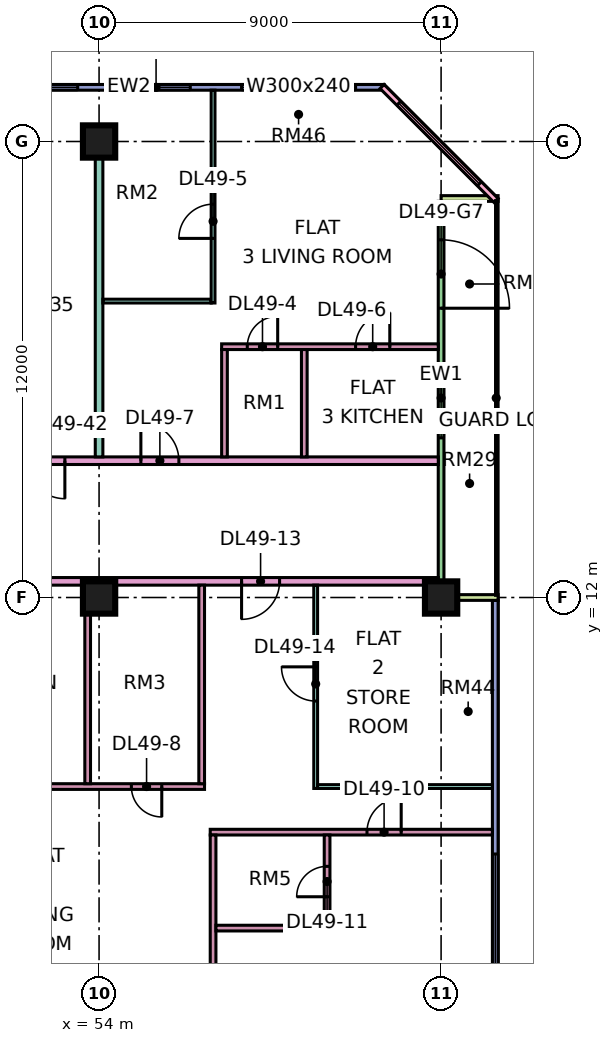
"""IFC4 building model, lengths in metres.
Left out: names, types, materials, properties, quantities, classifications, styles, units other than length and angle.
Written with IfcOpenShell. Run it as: python <this file> out.ifc"""

import sys

from ifc_helpers import new_model, si_unit, direction, frame, frame_2d, origin, origin_2d, place, context, subcontext, project, spatial, rectangle, extrude, element, fill, save


model = new_model("IFC4")
c1 = context("Model", 3, precision=1e-05, world=origin(), true_north=direction((0.0, 1.0)))
c2 = subcontext(c1, "Body", "Model", "MODEL_VIEW")
j1 = project(units=[si_unit("LENGTHUNIT", "METRE"), si_unit("PLANEANGLEUNIT", "RADIAN")], contexts=[c1])
p1 = place(None, origin())
s1 = spatial("IfcSite", under=j1, at=p1, CompositionType="ELEMENT")
p2 = place(p1, origin())
s2 = spatial("IfcBuilding", under=s1, at=p2, CompositionType="ELEMENT")
p3 = place(p2, frame((0.0, 0.0, 211.65)))
s3 = spatial("IfcBuildingStorey", under=s2, at=p3, CompositionType="ELEMENT", Elevation=211.65)
for number, where, z_axis, x_axis in (
    (1, (54.0, 12.0, 0.0), (0.0, 0.0, 1.0), (1.0, 0.0, 0.0)),
    (2, (54.0, 24.0, 0.0), (0.0, 0.0, 1.0), (1.0, 0.0, 0.0)),
    (3, (63.0, 12.0, 0.0), (0.0, 0.0, 1.0), (1.0, 0.0, 0.0)),
):
    element("IfcColumn", number, at=place(p3, frame(where, z_axis=z_axis, x_axis=x_axis)), inside=s3, PredefinedType="COLUMN", context=c2, shape_type="SweptSolid", body=[
        extrude(rectangle(XDim=0.85, YDim=0.85, at=origin_2d()), origin(), (0.0, 0.0, 1.0), 3.75),
    ])
p4 = place(p3, frame((61.5, 25.425, 0.0), z_axis=(0.0, 0.0, 1.0), x_axis=(-1.0, 0.0, 0.0)))
e4 = element("IfcWall", 4, at=p4, inside=s3, PredefinedType="SOLIDWALL", context=c2, shape_type="SweptSolid", body=[
    extrude(rectangle(XDim=13.425, YDim=0.15, at=frame_2d((6.712, 0.0))), origin(), (0.0, 0.0, 1.0), 3.35),
])
p5 = place(p4, frame((0.75, 0.0, 0.45)))
e5 = element("IfcOpeningElement", 5, at=p5, cuts=e4, PredefinedType="OPENING", context=c2, shape_type="SweptSolid", body=[
    extrude(rectangle(XDim=3.0, YDim=2.4, at=frame_2d((1.5, 1.2))), frame((0.0, 0.085, 0.0), z_axis=(0.0, -1.0, 0.0), x_axis=(1.0, 0.0, 0.0)), (0.0, 0.0, 1.0), 0.17),
])
p6 = place(p4, frame((5.1, 0.0, 0.45)))
e6 = element("IfcOpeningElement", 6, at=p6, cuts=e4, PredefinedType="OPENING", context=c2, shape_type="SweptSolid", body=[
    extrude(rectangle(XDim=1.8, YDim=2.4, at=frame_2d((0.9, 1.2))), frame((0.0, 0.085, 0.0), z_axis=(0.0, -1.0, 0.0), x_axis=(1.0, 0.0, 0.0)), (0.0, 0.0, 1.0), 0.17),
])
p7 = place(p4, frame((8.062, 0.0, 0.45)))
e7 = element("IfcOpeningElement", 7, at=p7, cuts=e4, PredefinedType="OPENING", context=c2, shape_type="SweptSolid", body=[
    extrude(rectangle(XDim=4.8, YDim=2.4, at=frame_2d((2.4, 1.2))), frame((0.0, 0.085, 0.0), z_axis=(0.0, -1.0, 0.0), x_axis=(1.0, 0.0, 0.0)), (0.0, 0.0, 1.0), 0.17),
])
p8 = place(p3, frame((64.425, 1.5, 0.0), z_axis=(0.0, 0.0, 1.0), x_axis=(0.0, 1.0, 0.0)))
e8 = element("IfcWall", 8, at=p8, inside=s3, PredefinedType="SOLIDWALL", context=c2, shape_type="SweptSolid", body=[
    extrude(rectangle(XDim=10.425, YDim=0.15, at=frame_2d((5.212, 0.0))), origin(), (0.0, 0.0, 1.0), 3.35),
])
p9 = place(p8, frame((0.75, 0.0, 0.45)))
e9 = element("IfcOpeningElement", 9, at=p9, cuts=e8, PredefinedType="OPENING", context=c2, shape_type="SweptSolid", body=[
    extrude(rectangle(XDim=3.0, YDim=2.4, at=frame_2d((1.5, 1.2))), frame((0.0, 0.085, 0.0), z_axis=(0.0, -1.0, 0.0), x_axis=(1.0, 0.0, 0.0)), (0.0, 0.0, 1.0), 0.17),
])
p10 = place(p3, frame((63.0, 12.075, 0.0), z_axis=(0.0, 0.0, 1.0), x_axis=(0.0, 1.0, 0.0)))
e10 = element("IfcWall", 10, at=p10, inside=s3, PredefinedType="SOLIDWALL", context=c2, shape_type="SweptSolid", body=[
    extrude(rectangle(XDim=10.35, YDim=0.15, at=frame_2d((5.175, 0.0))), origin(), (0.0, 0.0, 1.0), 3.35),
])
p11 = place(p10, frame((4.125, 0.0, 0.45)))
e11 = element("IfcOpeningElement", 11, at=p11, cuts=e10, PredefinedType="OPENING", context=c2, shape_type="SweptSolid", body=[
    extrude(rectangle(XDim=1.8, YDim=2.4, at=frame_2d((0.9, 1.2))), frame((0.0, 0.085, 0.0), z_axis=(0.0, -1.0, 0.0), x_axis=(1.0, 0.0, 0.0)), (0.0, 0.0, 1.0), 0.17),
])
p12 = place(p10, frame((7.538, 0.0, 0.0)))
e12 = element("IfcOpeningElement", 12, at=p12, cuts=e10, PredefinedType="OPENING", context=c2, shape_type="SweptSolid", body=[
    extrude(rectangle(XDim=1.8, YDim=2.4, at=frame_2d((0.9, 1.2))), frame((0.0, 0.085, 0.0), z_axis=(0.0, -1.0, 0.0), x_axis=(1.0, 0.0, 0.0)), (0.0, 0.0, 1.0), 0.17),
])
for number, where, z_axis, x_axis in (
    (13, (64.5, 12.0, 0.0), (0.0, 0.0, 1.0), (-1.0, 0.0, 0.0)),
    (14, (64.5, 22.5, 0.0), (0.0, 0.0, 1.0), (-1.0, 0.0, 0.0)),
):
    element("IfcWall", number, at=place(p3, frame(where, z_axis=z_axis, x_axis=x_axis)), inside=s3, PredefinedType="SOLIDWALL", context=c2, shape_type="SweptSolid", body=[
        extrude(rectangle(XDim=1.5, YDim=0.15, at=frame_2d((0.75, 0.0))), origin(), (0.0, 0.0, 1.0), 3.35),
    ])
p13 = place(p3, frame((64.447, 22.447, 0.0), z_axis=(0.0, 0.0, 1.0), x_axis=(-0.707106781187, 0.707106781187, 0.0)))
e15 = element("IfcWall", 15, at=p13, inside=s3, PredefinedType="SOLIDWALL", context=c2, shape_type="SweptSolid", body=[
    extrude(rectangle(XDim=4.243, YDim=0.15, at=frame_2d((2.121, 0.0))), origin(), (0.0, 0.0, 1.0), 3.35),
])
p14 = place(p13, frame((0.621, 0.0, 0.45)))
e16 = element("IfcOpeningElement", 16, at=p14, cuts=e15, PredefinedType="OPENING", context=c2, shape_type="SweptSolid", body=[
    extrude(rectangle(XDim=3.0, YDim=2.4, at=frame_2d((1.5, 1.2))), frame((0.0, 0.085, 0.0), z_axis=(0.0, -1.0, 0.0), x_axis=(1.0, 0.0, 0.0)), (0.0, 0.0, 1.0), 0.17),
])
p15 = place(p3, frame((40.65, 12.425, 0.0), z_axis=(0.0, 0.0, 1.0), x_axis=(1.0, 0.0, 0.0)))
e17 = element("IfcWall", 17, at=p15, inside=s3, PredefinedType="PARTITIONING", context=c2, shape_type="SweptSolid", body=[
    extrude(rectangle(XDim=22.276, YDim=0.2, at=frame_2d((11.138, 0.0))), origin(), (0.0, 0.0, 1.0), 3.35),
])
p16 = place(p15, frame((17.1, 0.0, 0.0)))
e18 = element("IfcOpeningElement", 18, at=p16, cuts=e17, PredefinedType="OPENING", context=c2, shape_type="SweptSolid", body=[
    extrude(rectangle(XDim=1.0, YDim=2.1, at=frame_2d((0.5, 1.05))), frame((0.0, 0.11, 0.0), z_axis=(0.0, -1.0, 0.0), x_axis=(1.0, 0.0, 0.0)), (0.0, 0.0, 1.0), 0.22),
])
p17 = place(p15, frame((1.05, 0.0, 0.0)))
e19 = element("IfcOpeningElement", 19, at=p17, cuts=e17, PredefinedType="OPENING", context=c2, shape_type="SweptSolid", body=[
    extrude(rectangle(XDim=1.0, YDim=2.1, at=frame_2d((0.5, 1.05))), frame((0.0, 0.11, 0.0), z_axis=(0.0, -1.0, 0.0), x_axis=(1.0, 0.0, 0.0)), (0.0, 0.0, 1.0), 0.22),
])
p18 = place(p3, frame((48.1, 7.025, 0.0), z_axis=(0.0, 0.0, 1.0), x_axis=(1.0, 0.0, 0.0)))
e20 = element("IfcWall", 20, at=p18, inside=s3, PredefinedType="PARTITIONING", context=c2, shape_type="SweptSolid", body=[
    extrude(rectangle(XDim=8.675, YDim=0.15, at=frame_2d((4.337, 0.0))), origin(), (0.0, 0.0, 1.0), 3.35),
])
p19 = place(p18, frame((6.75, 0.0, 0.0)))
e21 = element("IfcOpeningElement", 21, at=p19, cuts=e20, PredefinedType="OPENING", context=c2, shape_type="SweptSolid", body=[
    extrude(rectangle(XDim=0.8, YDim=2.1, at=frame_2d((0.4, 1.05))), frame((0.0, 0.085, 0.0), z_axis=(0.0, -1.0, 0.0), x_axis=(1.0, 0.0, 0.0)), (0.0, 0.0, 1.0), 0.17),
])
p20 = place(p18, frame((2.3, 0.0, 0.0)))
e22 = element("IfcOpeningElement", 22, at=p20, cuts=e20, PredefinedType="OPENING", context=c2, shape_type="SweptSolid", body=[
    extrude(rectangle(XDim=0.9, YDim=2.1, at=frame_2d((0.45, 1.05))), frame((0.0, 0.085, 0.0), z_axis=(0.0, -1.0, 0.0), x_axis=(1.0, 0.0, 0.0)), (0.0, 0.0, 1.0), 0.17),
])
p21 = place(p3, frame((51.225, 15.6, 0.0), z_axis=(0.0, 0.0, 1.0), x_axis=(1.0, 0.0, 0.0)))
e23 = element("IfcWall", 23, at=p21, inside=s3, PredefinedType="PARTITIONING", context=c2, shape_type="SweptSolid", body=[
    extrude(rectangle(XDim=11.701, YDim=0.2, at=frame_2d((5.851, 0.0))), origin(), (0.0, 0.0, 1.0), 3.35),
])
p22 = place(p21, frame((3.875, 0.0, 0.0)))
e24 = element("IfcOpeningElement", 24, at=p22, cuts=e23, PredefinedType="OPENING", context=c2, shape_type="SweptSolid", body=[
    extrude(rectangle(XDim=1.0, YDim=2.1, at=frame_2d((0.5, 1.05))), frame((0.0, 0.11, 0.0), z_axis=(0.0, -1.0, 0.0), x_axis=(1.0, 0.0, 0.0)), (0.0, 0.0, 1.0), 0.22),
])
p23 = place(p21, frame((0.875, 0.0, 0.0)))
e25 = element("IfcOpeningElement", 25, at=p23, cuts=e23, PredefinedType="OPENING", context=c2, shape_type="SweptSolid", body=[
    extrude(rectangle(XDim=1.0, YDim=2.1, at=frame_2d((0.5, 1.05))), frame((0.0, 0.11, 0.0), z_axis=(0.0, -1.0, 0.0), x_axis=(1.0, 0.0, 0.0)), (0.0, 0.0, 1.0), 0.22),
])
p24 = place(p3, frame((53.7, 7.1, 0.0), z_axis=(0.0, 0.0, 1.0), x_axis=(0.0, 1.0, 0.0)))
e26 = element("IfcWall", 26, at=p24, inside=s3, PredefinedType="PARTITIONING", context=c2, shape_type="SweptSolid", body=[
    extrude(rectangle(XDim=5.225, YDim=0.15, at=frame_2d((2.612, 0.0))), origin(), (0.0, 0.0, 1.0), 3.35),
])
p25 = place(p3, frame((54.0, 15.7, 0.0), z_axis=(0.0, 0.0, 1.0), x_axis=(0.0, 1.0, 0.0)))
e27 = element("IfcWall", 27, at=p25, inside=s3, PredefinedType="PARTITIONING", context=c2, shape_type="SweptSolid", body=[
    extrude(rectangle(XDim=8.3, YDim=0.2, at=frame_2d((4.15, 0.0))), origin(), (0.0, 0.0, 1.0), 3.35),
])
p26 = place(p3, frame((54.1, 19.8, 0.0), z_axis=(0.0, 0.0, 1.0), x_axis=(1.0, 0.0, 0.0)))
e28 = element("IfcWall", 28, at=p26, inside=s3, PredefinedType="PARTITIONING", context=c2, shape_type="SweptSolid", body=[
    extrude(rectangle(XDim=2.85, YDim=0.1, at=frame_2d((1.425, 0.0))), origin(), (0.0, 0.0, 1.0), 3.35),
])
p27 = place(p3, frame((56.7, 7.1, 0.0), z_axis=(0.0, 0.0, 1.0), x_axis=(0.0, 1.0, 0.0)))
e29 = element("IfcWall", 29, at=p27, inside=s3, PredefinedType="PARTITIONING", context=c2, shape_type="SweptSolid", body=[
    extrude(rectangle(XDim=5.225, YDim=0.15, at=frame_2d((2.612, 0.0))), origin(), (0.0, 0.0, 1.0), 3.35),
])
p28 = place(p3, frame((56.925, 5.825, 0.0), z_axis=(0.0, 0.0, 1.0), x_axis=(1.0, 0.0, 0.0)))
e30 = element("IfcWall", 30, at=p28, inside=s3, PredefinedType="PARTITIONING", context=c2, shape_type="SweptSolid", body=[
    extrude(rectangle(XDim=7.425, YDim=0.15, at=frame_2d((3.712, 0.0))), origin(), (0.0, 0.0, 1.0), 3.35),
])
p29 = place(p28, frame((4.125, 0.0, 0.0)))
e31 = element("IfcOpeningElement", 31, at=p29, cuts=e30, PredefinedType="OPENING", context=c2, shape_type="SweptSolid", body=[
    extrude(rectangle(XDim=0.9, YDim=2.1, at=frame_2d((0.45, 1.05))), frame((0.0, 0.085, 0.0), z_axis=(0.0, -1.0, 0.0), x_axis=(1.0, 0.0, 0.0)), (0.0, 0.0, 1.0), 0.17),
])
p30 = place(p3, frame((57.0, -1.35, 0.0), z_axis=(0.0, 0.0, 1.0), x_axis=(0.0, 1.0, 0.0)))
e32 = element("IfcWall", 32, at=p30, inside=s3, PredefinedType="PARTITIONING", context=c2, shape_type="SweptSolid", body=[
    extrude(rectangle(XDim=7.1, YDim=0.15, at=frame_2d((3.55, 0.0))), origin(), (0.0, 0.0, 1.0), 3.35),
])
p31 = place(p3, frame((57.0, 19.75, 0.0), z_axis=(0.0, 0.0, 1.0), x_axis=(0.0, 1.0, 0.0)))
e33 = element("IfcWall", 33, at=p31, inside=s3, PredefinedType="PARTITIONING", context=c2, shape_type="SweptSolid", body=[
    extrude(rectangle(XDim=5.6, YDim=0.1, at=frame_2d((2.8, 0.0))), origin(), (0.0, 0.0, 1.0), 3.35),
])
p32 = place(p31, frame((1.7, 0.0, 0.0)))
e34 = element("IfcOpeningElement", 34, at=p32, cuts=e33, PredefinedType="OPENING", context=c2, shape_type="SweptSolid", body=[
    extrude(rectangle(XDim=0.9, YDim=2.1, at=frame_2d((0.45, 1.05))), frame((0.0, 0.06, 0.0), z_axis=(0.0, -1.0, 0.0), x_axis=(1.0, 0.0, 0.0)), (0.0, 0.0, 1.0), 0.12),
])
p33 = place(p3, frame((57.075, 3.3, 0.0), z_axis=(0.0, 0.0, 1.0), x_axis=(1.0, 0.0, 0.0)))
e35 = element("IfcWall", 35, at=p33, inside=s3, PredefinedType="PARTITIONING", context=c2, shape_type="SweptSolid", body=[
    extrude(rectangle(XDim=3.0, YDim=0.15, at=frame_2d((1.5, 0.0))), origin(), (0.0, 0.0, 1.0), 3.35),
])
p34 = place(p3, frame((57.225, 18.6, 0.0), z_axis=(0.0, 0.0, 1.0), x_axis=(1.0, 0.0, 0.0)))
e36 = element("IfcWall", 36, at=p34, inside=s3, PredefinedType="PARTITIONING", context=c2, shape_type="SweptSolid", body=[
    extrude(rectangle(XDim=5.701, YDim=0.15, at=frame_2d((2.851, 0.0))), origin(), (0.0, 0.0, 1.0), 3.35),
])
p35 = place(p34, frame((0.675, 0.0, 0.0)))
e37 = element("IfcOpeningElement", 37, at=p35, cuts=e36, PredefinedType="OPENING", context=c2, shape_type="SweptSolid", body=[
    extrude(rectangle(XDim=0.8, YDim=2.1, at=frame_2d((0.4, 1.05))), frame((0.0, 0.085, 0.0), z_axis=(0.0, -1.0, 0.0), x_axis=(1.0, 0.0, 0.0)), (0.0, 0.0, 1.0), 0.17),
])
p36 = place(p34, frame((3.525, 0.0, 0.0)))
e38 = element("IfcOpeningElement", 38, at=p36, cuts=e36, PredefinedType="OPENING", context=c2, shape_type="SweptSolid", body=[
    extrude(rectangle(XDim=0.9, YDim=2.1, at=frame_2d((0.45, 1.05))), frame((0.0, 0.085, 0.0), z_axis=(0.0, -1.0, 0.0), x_axis=(1.0, 0.0, 0.0)), (0.0, 0.0, 1.0), 0.17),
])
for number, where, z_axis, x_axis in (
    (39, (57.3, 15.7, 0.0), (0.0, 0.0, 1.0), (0.0, 1.0, 0.0)),
    (40, (59.4, 15.7, 0.0), (0.0, 0.0, 1.0), (0.0, 1.0, 0.0)),
):
    element("IfcWall", number, at=place(p3, frame(where, z_axis=z_axis, x_axis=x_axis)), inside=s3, PredefinedType="PARTITIONING", context=c2, shape_type="SweptSolid", body=[
        extrude(rectangle(XDim=2.825, YDim=0.15, at=frame_2d((1.413, 0.0))), origin(), (0.0, 0.0, 1.0), 3.35),
    ])
p37 = place(p3, frame((59.7, 6.975, 0.0), z_axis=(0.0, 0.0, 1.0), x_axis=(0.0, 1.0, 0.0)))
e41 = element("IfcWall", 41, at=p37, inside=s3, PredefinedType="PARTITIONING", context=c2, shape_type="SweptSolid", body=[
    extrude(rectangle(XDim=5.35, YDim=0.1, at=frame_2d((2.675, 0.0))), origin(), (0.0, 0.0, 1.0), 3.35),
])
p38 = place(p37, frame((2.3, 0.0, 0.0)))
e42 = element("IfcOpeningElement", 42, at=p38, cuts=e41, PredefinedType="OPENING", context=c2, shape_type="SweptSolid", body=[
    extrude(rectangle(XDim=0.9, YDim=2.1, at=frame_2d((0.45, 1.05))), frame((0.0, 0.06, 0.0), z_axis=(0.0, -1.0, 0.0), x_axis=(1.0, 0.0, 0.0)), (0.0, 0.0, 1.0), 0.12),
])
p39 = place(p3, frame((59.75, 7.025, 0.0), z_axis=(0.0, 0.0, 1.0), x_axis=(1.0, 0.0, 0.0)))
e43 = element("IfcWall", 43, at=p39, inside=s3, PredefinedType="PARTITIONING", context=c2, shape_type="SweptSolid", body=[
    extrude(rectangle(XDim=4.6, YDim=0.1, at=frame_2d((2.3, 0.0))), origin(), (0.0, 0.0, 1.0), 3.35),
])
p40 = place(p3, frame((60.0, 3.375, 0.0), z_axis=(0.0, 0.0, 1.0), x_axis=(0.0, 1.0, 0.0)))
e44 = element("IfcWall", 44, at=p40, inside=s3, PredefinedType="PARTITIONING", context=c2, shape_type="SweptSolid", body=[
    extrude(rectangle(XDim=2.375, YDim=0.15, at=frame_2d((1.188, 0.0))), origin(), (0.0, 0.0, 1.0), 3.35),
])
p41 = place(p40, frame((0.75, 0.0, 0.0)))
e45 = element("IfcOpeningElement", 45, at=p41, cuts=e44, PredefinedType="OPENING", context=c2, shape_type="SweptSolid", body=[
    extrude(rectangle(XDim=0.8, YDim=2.1, at=frame_2d((0.4, 1.05))), frame((0.0, 0.085, 0.0), z_axis=(0.0, -1.0, 0.0), x_axis=(1.0, 0.0, 0.0)), (0.0, 0.0, 1.0), 0.17),
])
p42 = place(p5, origin())
e46 = element("IfcWindow", 46, at=p42, inside=s3, PartitioningType="SINGLE_PANEL", PredefinedType="WINDOW", context=c2, shape_type="SweptSolid", body=[
    extrude(rectangle(XDim=3.0, YDim=2.4, at=frame_2d((1.5, 1.2))), frame((0.0, 0.03, 0.0), z_axis=(0.0, -1.0, 0.0), x_axis=(1.0, 0.0, 0.0)), (0.0, 0.0, 1.0), 0.06),
])
fill(e5, e46)
p43 = place(p6, origin())
e47 = element("IfcWindow", 47, at=p43, inside=s3, PartitioningType="SINGLE_PANEL", PredefinedType="WINDOW", context=c2, shape_type="SweptSolid", body=[
    extrude(rectangle(XDim=1.8, YDim=2.4, at=frame_2d((0.9, 1.2))), frame((0.0, 0.03, 0.0), z_axis=(0.0, -1.0, 0.0), x_axis=(1.0, 0.0, 0.0)), (0.0, 0.0, 1.0), 0.06),
])
fill(e6, e47)
p44 = place(p7, origin())
e48 = element("IfcWindow", 48, at=p44, inside=s3, PartitioningType="SINGLE_PANEL", PredefinedType="WINDOW", context=c2, shape_type="SweptSolid", body=[
    extrude(rectangle(XDim=4.8, YDim=2.4, at=frame_2d((2.4, 1.2))), frame((0.0, 0.03, 0.0), z_axis=(0.0, -1.0, 0.0), x_axis=(1.0, 0.0, 0.0)), (0.0, 0.0, 1.0), 0.06),
])
fill(e7, e48)
p45 = place(p9, origin())
e49 = element("IfcWindow", 49, at=p45, inside=s3, PartitioningType="SINGLE_PANEL", PredefinedType="WINDOW", context=c2, shape_type="SweptSolid", body=[
    extrude(rectangle(XDim=3.0, YDim=2.4, at=frame_2d((1.5, 1.2))), frame((0.0, 0.03, 0.0), z_axis=(0.0, -1.0, 0.0), x_axis=(1.0, 0.0, 0.0)), (0.0, 0.0, 1.0), 0.06),
])
fill(e9, e49)
p46 = place(p11, origin())
e50 = element("IfcWindow", 50, at=p46, inside=s3, PartitioningType="SINGLE_PANEL", PredefinedType="WINDOW", context=c2, shape_type="SweptSolid", body=[
    extrude(rectangle(XDim=1.8, YDim=2.4, at=frame_2d((0.9, 1.2))), frame((0.0, 0.03, 0.0), z_axis=(0.0, -1.0, 0.0), x_axis=(1.0, 0.0, 0.0)), (0.0, 0.0, 1.0), 0.06),
])
fill(e11, e50)
p47 = place(p12, frame((1.8, 0.0, 0.0), z_axis=(0.0, 0.0, 1.0), x_axis=(-1.0, 0.0, 0.0)))
e51 = element("IfcDoor", 51, at=p47, inside=s3, OperationType="DOUBLE_DOOR_SINGLE_SWING", PredefinedType="DOOR", context=c2, shape_type="SweptSolid", body=[
    extrude(rectangle(XDim=1.8, YDim=2.4, at=frame_2d((0.9, 1.2))), frame((0.0, 0.025, 0.0), z_axis=(0.0, -1.0, 0.0), x_axis=(1.0, 0.0, 0.0)), (0.0, 0.0, 1.0), 0.05),
])
fill(e12, e51)
p48 = place(p14, origin())
e52 = element("IfcWindow", 52, at=p48, inside=s3, PartitioningType="SINGLE_PANEL", PredefinedType="WINDOW", context=c2, shape_type="SweptSolid", body=[
    extrude(rectangle(XDim=3.0, YDim=2.4, at=frame_2d((1.5, 1.2))), frame((0.0, 0.03, 0.0), z_axis=(0.0, -1.0, 0.0), x_axis=(1.0, 0.0, 0.0)), (0.0, 0.0, 1.0), 0.06),
])
fill(e16, e52)
p49 = place(p35, frame((0.8, 0.0, 0.0), z_axis=(0.0, 0.0, 1.0), x_axis=(-1.0, 0.0, 0.0)))
e53 = element("IfcDoor", 53, at=p49, inside=s3, OperationType="SINGLE_SWING_RIGHT", PredefinedType="DOOR", context=c2, shape_type="SweptSolid", body=[
    extrude(rectangle(XDim=0.8, YDim=2.1, at=frame_2d((0.4, 1.05))), frame((0.0, 0.025, 0.0), z_axis=(0.0, -1.0, 0.0), x_axis=(1.0, 0.0, 0.0)), (0.0, 0.0, 1.0), 0.05),
])
fill(e37, e53)
p50 = place(p32, origin())
e54 = element("IfcDoor", 54, at=p50, inside=s3, OperationType="SINGLE_SWING_LEFT", PredefinedType="DOOR", context=c2, shape_type="SweptSolid", body=[
    extrude(rectangle(XDim=0.9, YDim=2.1, at=frame_2d((0.45, 1.05))), frame((0.0, 0.025, 0.0), z_axis=(0.0, -1.0, 0.0), x_axis=(1.0, 0.0, 0.0)), (0.0, 0.0, 1.0), 0.05),
])
fill(e34, e54)
p51 = place(p36, frame((0.9, 0.0, 0.0), z_axis=(0.0, 0.0, 1.0), x_axis=(-1.0, 0.0, 0.0)))
e55 = element("IfcDoor", 55, at=p51, inside=s3, OperationType="SINGLE_SWING_RIGHT", PredefinedType="DOOR", context=c2, shape_type="SweptSolid", body=[
    extrude(rectangle(XDim=0.9, YDim=2.1, at=frame_2d((0.45, 1.05))), frame((0.0, 0.025, 0.0), z_axis=(0.0, -1.0, 0.0), x_axis=(1.0, 0.0, 0.0)), (0.0, 0.0, 1.0), 0.05),
])
fill(e38, e55)
p52 = place(p22, origin())
e56 = element("IfcDoor", 56, at=p52, inside=s3, OperationType="SINGLE_SWING_LEFT", PredefinedType="DOOR", context=c2, shape_type="SweptSolid", body=[
    extrude(rectangle(XDim=1.0, YDim=2.1, at=frame_2d((0.5, 1.05))), frame((0.0, 0.025, 0.0), z_axis=(0.0, -1.0, 0.0), x_axis=(1.0, 0.0, 0.0)), (0.0, 0.0, 1.0), 0.05),
])
fill(e24, e56)
p53 = place(p19, origin())
e57 = element("IfcDoor", 57, at=p53, inside=s3, OperationType="SINGLE_SWING_RIGHT", PredefinedType="DOOR", context=c2, shape_type="SweptSolid", body=[
    extrude(rectangle(XDim=0.8, YDim=2.1, at=frame_2d((0.4, 1.05))), frame((0.0, 0.025, 0.0), z_axis=(0.0, -1.0, 0.0), x_axis=(1.0, 0.0, 0.0)), (0.0, 0.0, 1.0), 0.05),
])
fill(e21, e57)
p54 = place(p29, frame((0.9, 0.0, 0.0), z_axis=(0.0, 0.0, 1.0), x_axis=(-1.0, 0.0, 0.0)))
e58 = element("IfcDoor", 58, at=p54, inside=s3, OperationType="SINGLE_SWING_RIGHT", PredefinedType="DOOR", context=c2, shape_type="SweptSolid", body=[
    extrude(rectangle(XDim=0.9, YDim=2.1, at=frame_2d((0.45, 1.05))), frame((0.0, 0.025, 0.0), z_axis=(0.0, -1.0, 0.0), x_axis=(1.0, 0.0, 0.0)), (0.0, 0.0, 1.0), 0.05),
])
fill(e31, e58)
p55 = place(p41, origin())
e59 = element("IfcDoor", 59, at=p55, inside=s3, OperationType="SINGLE_SWING_LEFT", PredefinedType="DOOR", context=c2, shape_type="SweptSolid", body=[
    extrude(rectangle(XDim=0.8, YDim=2.1, at=frame_2d((0.4, 1.05))), frame((0.0, 0.025, 0.0), z_axis=(0.0, -1.0, 0.0), x_axis=(1.0, 0.0, 0.0)), (0.0, 0.0, 1.0), 0.05),
])
fill(e45, e59)
p56 = place(p16, frame((1.0, 0.0, 0.0), z_axis=(0.0, 0.0, 1.0), x_axis=(-1.0, 0.0, 0.0)))
e60 = element("IfcDoor", 60, at=p56, inside=s3, OperationType="SINGLE_SWING_LEFT", PredefinedType="DOOR", context=c2, shape_type="SweptSolid", body=[
    extrude(rectangle(XDim=1.0, YDim=2.1, at=frame_2d((0.5, 1.05))), frame((0.0, 0.025, 0.0), z_axis=(0.0, -1.0, 0.0), x_axis=(1.0, 0.0, 0.0)), (0.0, 0.0, 1.0), 0.05),
])
fill(e18, e60)
p57 = place(p38, frame((0.9, 0.0, 0.0), z_axis=(0.0, 0.0, 1.0), x_axis=(-1.0, 0.0, 0.0)))
e61 = element("IfcDoor", 61, at=p57, inside=s3, OperationType="SINGLE_SWING_RIGHT", PredefinedType="DOOR", context=c2, shape_type="SweptSolid", body=[
    extrude(rectangle(XDim=0.9, YDim=2.1, at=frame_2d((0.45, 1.05))), frame((0.0, 0.025, 0.0), z_axis=(0.0, -1.0, 0.0), x_axis=(1.0, 0.0, 0.0)), (0.0, 0.0, 1.0), 0.05),
])
fill(e42, e61)
p58 = place(p23, origin())
e62 = element("IfcDoor", 62, at=p58, inside=s3, OperationType="SINGLE_SWING_RIGHT", PredefinedType="DOOR", context=c2, shape_type="SweptSolid", body=[
    extrude(rectangle(XDim=1.0, YDim=2.1, at=frame_2d((0.5, 1.05))), frame((0.0, 0.025, 0.0), z_axis=(0.0, -1.0, 0.0), x_axis=(1.0, 0.0, 0.0)), (0.0, 0.0, 1.0), 0.05),
])
fill(e25, e62)
save(model, sys.argv[1])
